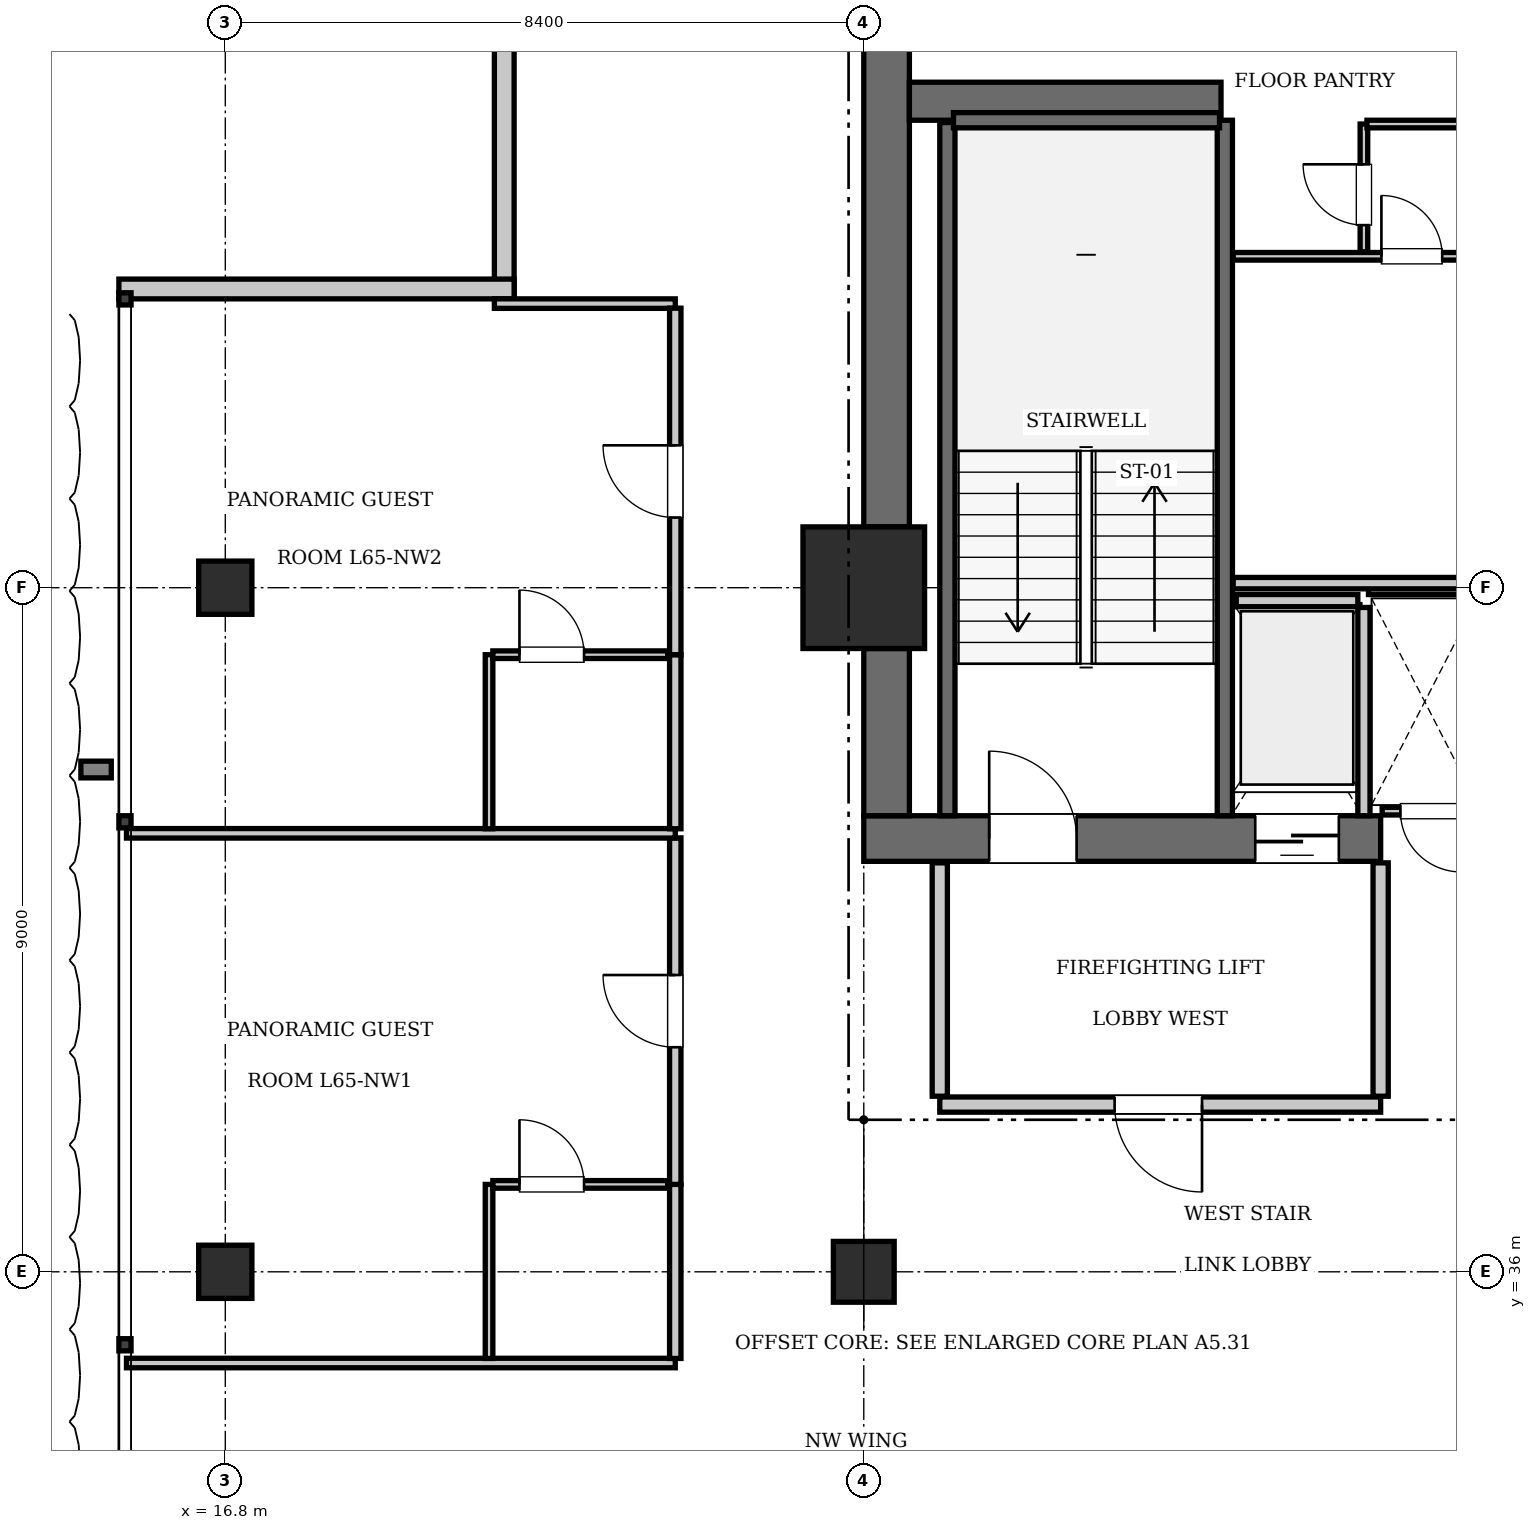
"""IFC4 building model, lengths in metres.
Left out: names, types, materials, properties, quantities, classifications, styles, units other than length and angle.
Written with IfcOpenShell. Run it as: python <this file> out.ifc"""

import sys

from ifc_helpers import new_model, si_unit, direction, frame, frame_2d, origin, origin_2d, place, context, subcontext, project, spatial, rectangle, extrude, element, fill, save


model = new_model("IFC4")
c1 = context("Model", 3, precision=1e-05, world=origin(), true_north=direction((0.0, 1.0)))
c2 = subcontext(c1, "Body", "Model", "MODEL_VIEW")
j1 = project(units=[si_unit("LENGTHUNIT", "METRE"), si_unit("PLANEANGLEUNIT", "RADIAN")], contexts=[c1])
p1 = place(None, origin())
s1 = spatial("IfcSite", under=j1, at=p1, CompositionType="ELEMENT")
p2 = place(p1, origin())
s2 = spatial("IfcBuilding", under=s1, at=p2, CompositionType="ELEMENT")
p3 = place(p2, frame((0.0, 0.0, 266.35)))
s3 = spatial("IfcBuildingStorey", under=s2, at=p3, CompositionType="ELEMENT", Elevation=266.35)
p4 = place(p3, frame((25.2, 45.0, 0.0), z_axis=(0.0, 0.0, 1.0), x_axis=(1.0, 0.0, 0.0)))
e1 = element("IfcColumn", 1, at=p4, inside=s3, PredefinedType="COLUMN", context=c2, shape_type="SweptSolid", body=[
    extrude(rectangle(XDim=1.6, YDim=1.6, at=origin_2d()), origin(), (0.0, 0.0, 1.0), 3.85),
])
p5 = place(p3, frame((25.2, 41.7, 0.0), z_axis=(0.0, 0.0, 1.0), x_axis=(1.0, 0.0, 0.0)))
e2 = element("IfcWall", 2, at=p5, inside=s3, PredefinedType="SHEAR", context=c2, shape_type="SweptSolid", body=[
    extrude(rectangle(XDim=6.8, YDim=0.6, at=frame_2d((3.4, 0.0))), origin(), (0.0, 0.0, 1.0), 3.85),
])
p6 = place(p5, frame((1.65, 0.0, 0.0)))
e3 = element("IfcOpeningElement", 3, at=p6, cuts=e2, PredefinedType="OPENING", context=c2, shape_type="SweptSolid", body=[
    extrude(rectangle(XDim=1.15, YDim=2.15, at=frame_2d((0.575, 1.075))), frame((0.0, 0.31, 0.0), z_axis=(0.0, -1.0, 0.0), x_axis=(1.0, 0.0, 0.0)), (0.0, 0.0, 1.0), 0.62),
])
p7 = place(p5, frame((5.15, 0.0, 0.0)))
e4 = element("IfcOpeningElement", 4, at=p7, cuts=e2, PredefinedType="OPENING", context=c2, shape_type="SweptSolid", body=[
    extrude(rectangle(XDim=1.1, YDim=2.2, at=frame_2d((0.55, 1.1))), frame((0.0, 0.31, 0.0), z_axis=(0.0, -1.0, 0.0), x_axis=(1.0, 0.0, 0.0)), (0.0, 0.0, 1.0), 0.62),
])
p8 = place(p3, frame((25.5, 42.0, 0.0), z_axis=(0.0, 0.0, 1.0), x_axis=(0.0, 1.0, 0.0)))
e5 = element("IfcWall", 5, at=p8, inside=s3, PredefinedType="SHEAR", context=c2, shape_type="SweptSolid", body=[
    extrude(rectangle(XDim=2.2, YDim=0.6, at=frame_2d((1.1, 0.0))), origin(), (0.0, 0.0, 1.0), 3.85),
])
p9 = place(p3, frame((25.5, 45.8, 0.0), z_axis=(0.0, 0.0, 1.0), x_axis=(0.0, 1.0, 0.0)))
e6 = element("IfcWall", 6, at=p9, inside=s3, PredefinedType="SHEAR", context=c2, shape_type="SweptSolid", body=[
    extrude(rectangle(XDim=7.6, YDim=0.6, at=frame_2d((3.8, 0.0))), origin(), (0.0, 0.0, 1.0), 3.85),
])
p10 = place(p3, frame((25.8, 51.4, 0.0), z_axis=(0.0, 0.0, 1.0), x_axis=(1.0, 0.0, 0.0)))
e7 = element("IfcWall", 7, at=p10, inside=s3, PredefinedType="SHEAR", context=c2, shape_type="SweptSolid", body=[
    extrude(rectangle(XDim=4.1, YDim=0.5, at=frame_2d((2.05, 0.0))), origin(), (0.0, 0.0, 1.0), 3.85),
])
p11 = place(p3, frame((25.2, 36.0, 0.0), z_axis=(0.0, 0.0, 1.0), x_axis=(1.0, 0.0, 0.0)))
e8 = element("IfcColumn", 8, at=p11, inside=s3, PredefinedType="COLUMN", context=c2, shape_type="SweptSolid", body=[
    extrude(rectangle(XDim=0.8, YDim=0.8, at=origin_2d()), origin(), (0.0, 0.0, 1.0), 3.85),
])
for number, where, z_axis, x_axis in (
    (9, (16.8, 36.0, 0.0), (0.0, 0.0, 1.0), (1.0, 0.0, 0.0)),
    (10, (16.8, 45.0, 0.0), (0.0, 0.0, 1.0), (1.0, 0.0, 0.0)),
):
    element("IfcColumn", number, at=place(p3, frame(where, z_axis=z_axis, x_axis=x_axis)), inside=s3, PredefinedType="COLUMN", context=c2, shape_type="SweptSolid", body=[
        extrude(rectangle(XDim=0.7, YDim=0.7, at=origin_2d()), origin(), (0.0, 0.0, 1.0), 3.85),
    ])
p12 = place(p3, frame((29.95, 42.0, 0.0), z_axis=(0.0, 0.0, 1.0), x_axis=(0.0, 1.0, 0.0)))
e11 = element("IfcWall", 11, at=p12, inside=s3, PredefinedType="SOLIDWALL", context=c2, shape_type="SweptSolid", body=[
    extrude(rectangle(XDim=9.15, YDim=0.2, at=frame_2d((4.575, 0.0))), origin(), (0.0, 0.0, 1.0), 3.61),
])
p13 = place(p3, frame((26.3, 42.0, 0.0), z_axis=(0.0, 0.0, 1.0), x_axis=(0.0, 1.0, 0.0)))
e12 = element("IfcWall", 12, at=p13, inside=s3, PredefinedType="SOLIDWALL", context=c2, shape_type="SweptSolid", body=[
    extrude(rectangle(XDim=9.12, YDim=0.2, at=frame_2d((4.56, 0.0))), origin(), (0.0, 0.0, 1.0), 3.61),
])
p14 = place(p3, frame((26.38, 51.15, 0.0), z_axis=(0.0, 0.0, 1.0), x_axis=(1.0, 0.0, 0.0)))
e13 = element("IfcWall", 13, at=p14, inside=s3, PredefinedType="SOLIDWALL", context=c2, shape_type="SweptSolid", body=[
    extrude(rectangle(XDim=3.5, YDim=0.2, at=frame_2d((1.75, 0.0))), origin(), (0.0, 0.0, 1.0), 3.61),
])
p15 = place(p3, frame((30.1, 44.83, 0.0), z_axis=(0.0, 0.0, 1.0), x_axis=(1.0, 0.0, 0.0)))
e14 = element("IfcWall", 14, at=p15, inside=s3, PredefinedType="SOLIDWALL", context=c2, shape_type="SweptSolid", body=[
    extrude(rectangle(XDim=1.6, YDim=0.16, at=frame_2d((0.8, 0.0))), origin(), (0.0, 0.0, 1.0), 3.61),
])
p16 = place(p3, frame((31.78, 42.0, 0.0), z_axis=(0.0, 0.0, 1.0), x_axis=(0.0, 1.0, 0.0)))
e15 = element("IfcWall", 15, at=p16, inside=s3, PredefinedType="SOLIDWALL", context=c2, shape_type="SweptSolid", body=[
    extrude(rectangle(XDim=2.74, YDim=0.16, at=frame_2d((1.37, 0.0))), origin(), (0.0, 0.0, 1.0), 3.61),
])
p17 = place(p3, frame((20.47, 48.8, 0.0), z_axis=(0.0, 0.0, 1.0), x_axis=(0.0, 1.0, 0.0)))
e16 = element("IfcWall", 16, at=p17, inside=s3, PredefinedType="SOLIDWALL", context=c2, shape_type="SweptSolid", body=[
    extrude(rectangle(XDim=5.2, YDim=0.26, at=frame_2d((2.6, 0.0))), origin(), (0.0, 0.0, 1.0), 3.61),
])
p18 = place(p3, frame((15.4, 48.93, 0.0), z_axis=(0.0, 0.0, 1.0), x_axis=(1.0, 0.0, 0.0)))
e17 = element("IfcWall", 17, at=p18, inside=s3, PredefinedType="SOLIDWALL", context=c2, shape_type="SweptSolid", body=[
    extrude(rectangle(XDim=5.2, YDim=0.26, at=frame_2d((2.6, 0.0))), origin(), (0.0, 0.0, 1.0), 3.61),
])
p19 = place(p3, frame((26.2, 38.2, 0.0), z_axis=(0.0, 0.0, 1.0), x_axis=(1.0, 0.0, 0.0)))
e18 = element("IfcWall", 18, at=p19, inside=s3, PredefinedType="PARTITIONING", context=c2, shape_type="SweptSolid", body=[
    extrude(rectangle(XDim=5.8, YDim=0.2, at=frame_2d((2.9, 0.0))), origin(), (0.0, 0.0, 1.0), 3.61),
])
p20 = place(p19, frame((2.3, 0.0, 0.0)))
e19 = element("IfcOpeningElement", 19, at=p20, cuts=e18, PredefinedType="OPENING", context=c2, shape_type="SweptSolid", body=[
    extrude(rectangle(XDim=1.15, YDim=2.15, at=frame_2d((0.575, 1.075))), frame((0.0, 0.11, 0.0), z_axis=(0.0, -1.0, 0.0), x_axis=(1.0, 0.0, 0.0)), (0.0, 0.0, 1.0), 0.22),
])
for number, where, z_axis, x_axis in (
    (20, (26.2, 38.31, 0.0), (0.0, 0.0, 1.0), (0.0, 1.0, 0.0)),
    (21, (32.0, 38.31, 0.0), (0.0, 0.0, 1.0), (0.0, 1.0, 0.0)),
):
    element("IfcWall", number, at=place(p3, frame(where, z_axis=z_axis, x_axis=x_axis)), inside=s3, PredefinedType="PARTITIONING", context=c2, shape_type="SweptSolid", body=[
        extrude(rectangle(XDim=3.07, YDim=0.2, at=frame_2d((1.535, 0.0))), origin(), (0.0, 0.0, 1.0), 3.61),
    ])
p21 = place(p3, frame((32.02, 42.06, 0.0), z_axis=(0.0, 0.0, 1.0), x_axis=(1.0, 0.0, 0.0)))
e22 = element("IfcWall", 22, at=p21, inside=s3, PredefinedType="PARTITIONING", context=c2, shape_type="SweptSolid", body=[
    extrude(rectangle(XDim=1.32, YDim=0.1, at=frame_2d((0.66, 0.0))), origin(), (0.0, 0.0, 1.0), 3.61),
])
p22 = place(p21, frame((0.24, 0.0, 0.0)))
e23 = element("IfcOpeningElement", 23, at=p22, cuts=e22, PredefinedType="OPENING", context=c2, shape_type="SweptSolid", body=[
    extrude(rectangle(XDim=0.8, YDim=2.05, at=frame_2d((0.4, 1.025))), frame((0.0, 0.06, 0.0), z_axis=(0.0, -1.0, 0.0), x_axis=(1.0, 0.0, 0.0)), (0.0, 0.0, 1.0), 0.12),
])
p23 = place(p3, frame((31.84, 44.96, 0.0), z_axis=(0.0, 0.0, 1.0), x_axis=(1.0, 0.0, 0.0)))
e24 = element("IfcWall", 24, at=p23, inside=s3, PredefinedType="PARTITIONING", context=c2, shape_type="SweptSolid", body=[
    extrude(rectangle(XDim=1.48, YDim=0.1, at=frame_2d((0.74, 0.0))), origin(), (0.0, 0.0, 1.0), 3.61),
])
p24 = place(p3, frame((30.06, 45.06, 0.0), z_axis=(0.0, 0.0, 1.0), x_axis=(1.0, 0.0, 0.0)))
e25 = element("IfcWall", 25, at=p24, inside=s3, PredefinedType="PARTITIONING", context=c2, shape_type="SweptSolid", body=[
    extrude(rectangle(XDim=3.18, YDim=0.15, at=frame_2d((1.59, 0.0))), origin(), (0.0, 0.0, 1.0), 3.61),
])
p25 = place(p3, frame((30.06, 49.36, 0.0), z_axis=(0.0, 0.0, 1.0), x_axis=(1.0, 0.0, 0.0)))
e26 = element("IfcWall", 26, at=p25, inside=s3, PredefinedType="PARTITIONING", context=c2, shape_type="SweptSolid", body=[
    extrude(rectangle(XDim=3.18, YDim=0.1, at=frame_2d((1.59, 0.0))), origin(), (0.0, 0.0, 1.0), 3.61),
])
p26 = place(p25, frame((1.95, 0.0, 0.0)))
e27 = element("IfcOpeningElement", 27, at=p26, cuts=e26, PredefinedType="OPENING", context=c2, shape_type="SweptSolid", body=[
    extrude(rectangle(XDim=0.8, YDim=2.05, at=frame_2d((0.4, 1.025))), frame((0.0, 0.06, 0.0), z_axis=(0.0, -1.0, 0.0), x_axis=(1.0, 0.0, 0.0)), (0.0, 0.0, 1.0), 0.12),
])
p27 = place(p3, frame((31.78, 49.42, 0.0), z_axis=(0.0, 0.0, 1.0), x_axis=(0.0, 1.0, 0.0)))
e28 = element("IfcWall", 28, at=p27, inside=s3, PredefinedType="PARTITIONING", context=c2, shape_type="SweptSolid", body=[
    extrude(rectangle(XDim=1.68, YDim=0.1, at=frame_2d((0.84, 0.0))), origin(), (0.0, 0.0, 1.0), 3.61),
])
p28 = place(p27, frame((0.35, 0.0, 0.0)))
e29 = element("IfcOpeningElement", 29, at=p28, cuts=e28, PredefinedType="OPENING", context=c2, shape_type="SweptSolid", body=[
    extrude(rectangle(XDim=0.8, YDim=2.05, at=frame_2d((0.4, 1.025))), frame((0.0, 0.06, 0.0), z_axis=(0.0, -1.0, 0.0), x_axis=(1.0, 0.0, 0.0)), (0.0, 0.0, 1.0), 0.12),
])
p29 = place(p3, frame((31.82, 51.1, 0.0), z_axis=(0.0, 0.0, 1.0), x_axis=(1.0, 0.0, 0.0)))
e30 = element("IfcWall", 30, at=p29, inside=s3, PredefinedType="PARTITIONING", context=c2, shape_type="SweptSolid", body=[
    extrude(rectangle(XDim=1.42, YDim=0.1, at=frame_2d((0.71, 0.0))), origin(), (0.0, 0.0, 1.0), 3.61),
])
p30 = place(p3, frame((15.5, 34.8, 0.0), z_axis=(0.0, 0.0, 1.0), x_axis=(1.0, 0.0, 0.0)))
e31 = element("IfcWall", 31, at=p30, inside=s3, PredefinedType="PARTITIONING", context=c2, shape_type="SweptSolid", body=[
    extrude(rectangle(XDim=7.22, YDim=0.125, at=frame_2d((3.61, 0.0))), origin(), (0.0, 0.0, 1.0), 3.61),
])
p31 = place(p3, frame((20.34, 48.738, 0.0), z_axis=(0.0, 0.0, 1.0), x_axis=(1.0, 0.0, 0.0)))
e32 = element("IfcWall", 32, at=p31, inside=s3, PredefinedType="PARTITIONING", context=c2, shape_type="SweptSolid", body=[
    extrude(rectangle(XDim=2.38, YDim=0.125, at=frame_2d((1.19, 0.0))), origin(), (0.0, 0.0, 1.0), 3.61),
])
p32 = place(p3, frame((22.72, 34.86, 0.0), z_axis=(0.0, 0.0, 1.0), x_axis=(0.0, 1.0, 0.0)))
e33 = element("IfcWall", 33, at=p32, inside=s3, PredefinedType="PARTITIONING", context=c2, shape_type="SweptSolid", body=[
    extrude(rectangle(XDim=2.29, YDim=0.15, at=frame_2d((1.145, 0.0))), origin(), (0.0, 0.0, 1.0), 3.61),
])
p33 = place(p3, frame((22.72, 37.15, 0.0), z_axis=(0.0, 0.0, 1.0), x_axis=(0.0, 1.0, 0.0)))
e34 = element("IfcWall", 34, at=p33, inside=s3, PredefinedType="PARTITIONING", context=c2, shape_type="SweptSolid", body=[
    extrude(rectangle(XDim=4.559, YDim=0.15, at=frame_2d((2.279, 0.0))), origin(), (0.0, 0.0, 1.0), 3.61),
])
p34 = place(p33, frame((1.804, 0.0, 0.0)))
e35 = element("IfcOpeningElement", 35, at=p34, cuts=e34, PredefinedType="OPENING", context=c2, shape_type="SweptSolid", body=[
    extrude(rectangle(XDim=0.95, YDim=2.15, at=frame_2d((0.475, 1.075))), frame((0.0, 0.085, 0.0), z_axis=(0.0, -1.0, 0.0), x_axis=(1.0, 0.0, 0.0)), (0.0, 0.0, 1.0), 0.17),
])
p35 = place(p3, frame((20.27, 34.86, 0.0), z_axis=(0.0, 0.0, 1.0), x_axis=(0.0, 1.0, 0.0)))
e36 = element("IfcWall", 36, at=p35, inside=s3, PredefinedType="PARTITIONING", context=c2, shape_type="SweptSolid", body=[
    extrude(rectangle(XDim=2.29, YDim=0.1, at=frame_2d((1.145, 0.0))), origin(), (0.0, 0.0, 1.0), 3.61),
])
p36 = place(p3, frame((20.32, 37.15, 0.0), z_axis=(0.0, 0.0, 1.0), x_axis=(1.0, 0.0, 0.0)))
e37 = element("IfcWall", 37, at=p36, inside=s3, PredefinedType="PARTITIONING", context=c2, shape_type="SweptSolid", body=[
    extrude(rectangle(XDim=2.3, YDim=0.1, at=frame_2d((1.15, 0.0))), origin(), (0.0, 0.0, 1.0), 3.61),
])
p37 = place(p36, frame((0.35, 0.0, 0.0)))
e38 = element("IfcOpeningElement", 38, at=p37, cuts=e37, PredefinedType="OPENING", context=c2, shape_type="SweptSolid", body=[
    extrude(rectangle(XDim=0.85, YDim=2.1, at=frame_2d((0.425, 1.05))), frame((0.0, 0.06, 0.0), z_axis=(0.0, -1.0, 0.0), x_axis=(1.0, 0.0, 0.0)), (0.0, 0.0, 1.0), 0.12),
])
p38 = place(p3, frame((15.5, 41.769, 0.0), z_axis=(0.0, 0.0, 1.0), x_axis=(1.0, 0.0, 0.0)))
e39 = element("IfcWall", 39, at=p38, inside=s3, PredefinedType="PARTITIONING", context=c2, shape_type="SweptSolid", body=[
    extrude(rectangle(XDim=7.22, YDim=0.125, at=frame_2d((3.61, 0.0))), origin(), (0.0, 0.0, 1.0), 3.61),
])
p39 = place(p3, frame((22.72, 41.829, 0.0), z_axis=(0.0, 0.0, 1.0), x_axis=(0.0, 1.0, 0.0)))
e40 = element("IfcWall", 40, at=p39, inside=s3, PredefinedType="PARTITIONING", context=c2, shape_type="SweptSolid", body=[
    extrude(rectangle(XDim=2.29, YDim=0.15, at=frame_2d((1.145, 0.0))), origin(), (0.0, 0.0, 1.0), 3.61),
])
p40 = place(p3, frame((22.72, 44.119, 0.0), z_axis=(0.0, 0.0, 1.0), x_axis=(0.0, 1.0, 0.0)))
e41 = element("IfcWall", 41, at=p40, inside=s3, PredefinedType="PARTITIONING", context=c2, shape_type="SweptSolid", body=[
    extrude(rectangle(XDim=4.559, YDim=0.15, at=frame_2d((2.279, 0.0))), origin(), (0.0, 0.0, 1.0), 3.61),
])
p41 = place(p40, frame((1.804, 0.0, 0.0)))
e42 = element("IfcOpeningElement", 42, at=p41, cuts=e41, PredefinedType="OPENING", context=c2, shape_type="SweptSolid", body=[
    extrude(rectangle(XDim=0.95, YDim=2.15, at=frame_2d((0.475, 1.075))), frame((0.0, 0.085, 0.0), z_axis=(0.0, -1.0, 0.0), x_axis=(1.0, 0.0, 0.0)), (0.0, 0.0, 1.0), 0.17),
])
p42 = place(p3, frame((20.27, 41.829, 0.0), z_axis=(0.0, 0.0, 1.0), x_axis=(0.0, 1.0, 0.0)))
e43 = element("IfcWall", 43, at=p42, inside=s3, PredefinedType="PARTITIONING", context=c2, shape_type="SweptSolid", body=[
    extrude(rectangle(XDim=2.29, YDim=0.1, at=frame_2d((1.145, 0.0))), origin(), (0.0, 0.0, 1.0), 3.61),
])
p43 = place(p3, frame((20.32, 44.119, 0.0), z_axis=(0.0, 0.0, 1.0), x_axis=(1.0, 0.0, 0.0)))
e44 = element("IfcWall", 44, at=p43, inside=s3, PredefinedType="PARTITIONING", context=c2, shape_type="SweptSolid", body=[
    extrude(rectangle(XDim=2.3, YDim=0.1, at=frame_2d((1.15, 0.0))), origin(), (0.0, 0.0, 1.0), 3.61),
])
p44 = place(p43, frame((0.35, 0.0, 0.0)))
e45 = element("IfcOpeningElement", 45, at=p44, cuts=e44, PredefinedType="OPENING", context=c2, shape_type="SweptSolid", body=[
    extrude(rectangle(XDim=0.85, YDim=2.1, at=frame_2d((0.425, 1.05))), frame((0.0, 0.06, 0.0), z_axis=(0.0, -1.0, 0.0), x_axis=(1.0, 0.0, 0.0)), (0.0, 0.0, 1.0), 0.12),
])
p45 = place(p6, origin())
e46 = element("IfcDoor", 46, at=p45, inside=s3, OperationType="SINGLE_SWING_LEFT", PredefinedType="DOOR", context=c2, shape_type="SweptSolid", body=[
    extrude(rectangle(XDim=1.15, YDim=2.15, at=frame_2d((0.575, 1.075))), frame((0.0, 0.025, 0.0), z_axis=(0.0, -1.0, 0.0), x_axis=(1.0, 0.0, 0.0)), (0.0, 0.0, 1.0), 0.05),
])
fill(e3, e46)
p46 = place(p7, frame((1.1, 0.0, 0.0), z_axis=(0.0, 0.0, 1.0), x_axis=(-1.0, 0.0, 0.0)))
e47 = element("IfcDoor", 47, at=p46, inside=s3, OperationType="SLIDING_TO_LEFT", PredefinedType="DOOR", context=c2, shape_type="SweptSolid", body=[
    extrude(rectangle(XDim=1.1, YDim=2.2, at=frame_2d((0.55, 1.1))), frame((0.0, 0.025, 0.0), z_axis=(0.0, -1.0, 0.0), x_axis=(1.0, 0.0, 0.0)), (0.0, 0.0, 1.0), 0.05),
])
fill(e4, e47)
p47 = place(p20, frame((1.15, 0.0, 0.0), z_axis=(0.0, 0.0, 1.0), x_axis=(-1.0, 0.0, 0.0)))
e48 = element("IfcDoor", 48, at=p47, inside=s3, OperationType="SINGLE_SWING_LEFT", PredefinedType="DOOR", context=c2, shape_type="SweptSolid", body=[
    extrude(rectangle(XDim=1.15, YDim=2.15, at=frame_2d((0.575, 1.075))), frame((0.0, 0.025, 0.0), z_axis=(0.0, -1.0, 0.0), x_axis=(1.0, 0.0, 0.0)), (0.0, 0.0, 1.0), 0.05),
])
fill(e19, e48)
p48 = place(p22, frame((0.8, 0.0, 0.0), z_axis=(0.0, 0.0, 1.0), x_axis=(-1.0, 0.0, 0.0)))
e49 = element("IfcDoor", 49, at=p48, inside=s3, OperationType="SINGLE_SWING_LEFT", PredefinedType="DOOR", context=c2, shape_type="SweptSolid", body=[
    extrude(rectangle(XDim=0.8, YDim=2.05, at=frame_2d((0.4, 1.025))), frame((0.0, 0.025, 0.0), z_axis=(0.0, -1.0, 0.0), x_axis=(1.0, 0.0, 0.0)), (0.0, 0.0, 1.0), 0.05),
])
fill(e23, e49)
p49 = place(p26, origin())
e50 = element("IfcDoor", 50, at=p49, inside=s3, OperationType="SINGLE_SWING_LEFT", PredefinedType="DOOR", context=c2, shape_type="SweptSolid", body=[
    extrude(rectangle(XDim=0.8, YDim=2.05, at=frame_2d((0.4, 1.025))), frame((0.0, 0.025, 0.0), z_axis=(0.0, -1.0, 0.0), x_axis=(1.0, 0.0, 0.0)), (0.0, 0.0, 1.0), 0.05),
])
fill(e27, e50)
p50 = place(p28, origin())
e51 = element("IfcDoor", 51, at=p50, inside=s3, OperationType="SINGLE_SWING_RIGHT", PredefinedType="DOOR", context=c2, shape_type="SweptSolid", body=[
    extrude(rectangle(XDim=0.8, YDim=2.05, at=frame_2d((0.4, 1.025))), frame((0.0, 0.025, 0.0), z_axis=(0.0, -1.0, 0.0), x_axis=(1.0, 0.0, 0.0)), (0.0, 0.0, 1.0), 0.05),
])
fill(e29, e51)
p51 = place(p37, origin())
e52 = element("IfcDoor", 52, at=p51, inside=s3, OperationType="SINGLE_SWING_LEFT", PredefinedType="DOOR", context=c2, shape_type="SweptSolid", body=[
    extrude(rectangle(XDim=0.85, YDim=2.1, at=frame_2d((0.425, 1.05))), frame((0.0, 0.025, 0.0), z_axis=(0.0, -1.0, 0.0), x_axis=(1.0, 0.0, 0.0)), (0.0, 0.0, 1.0), 0.05),
])
fill(e38, e52)
p52 = place(p34, origin())
e53 = element("IfcDoor", 53, at=p52, inside=s3, OperationType="SINGLE_SWING_RIGHT", PredefinedType="DOOR", context=c2, shape_type="SweptSolid", body=[
    extrude(rectangle(XDim=0.95, YDim=2.15, at=frame_2d((0.475, 1.075))), frame((0.0, 0.025, 0.0), z_axis=(0.0, -1.0, 0.0), x_axis=(1.0, 0.0, 0.0)), (0.0, 0.0, 1.0), 0.05),
])
fill(e35, e53)
p53 = place(p44, origin())
e54 = element("IfcDoor", 54, at=p53, inside=s3, OperationType="SINGLE_SWING_LEFT", PredefinedType="DOOR", context=c2, shape_type="SweptSolid", body=[
    extrude(rectangle(XDim=0.85, YDim=2.1, at=frame_2d((0.425, 1.05))), frame((0.0, 0.025, 0.0), z_axis=(0.0, -1.0, 0.0), x_axis=(1.0, 0.0, 0.0)), (0.0, 0.0, 1.0), 0.05),
])
fill(e45, e54)
p54 = place(p41, origin())
e55 = element("IfcDoor", 55, at=p54, inside=s3, OperationType="SINGLE_SWING_RIGHT", PredefinedType="DOOR", context=c2, shape_type="SweptSolid", body=[
    extrude(rectangle(XDim=0.95, YDim=2.15, at=frame_2d((0.475, 1.075))), frame((0.0, 0.025, 0.0), z_axis=(0.0, -1.0, 0.0), x_axis=(1.0, 0.0, 0.0)), (0.0, 0.0, 1.0), 0.05),
])
fill(e42, e55)
save(model, sys.argv[1])
